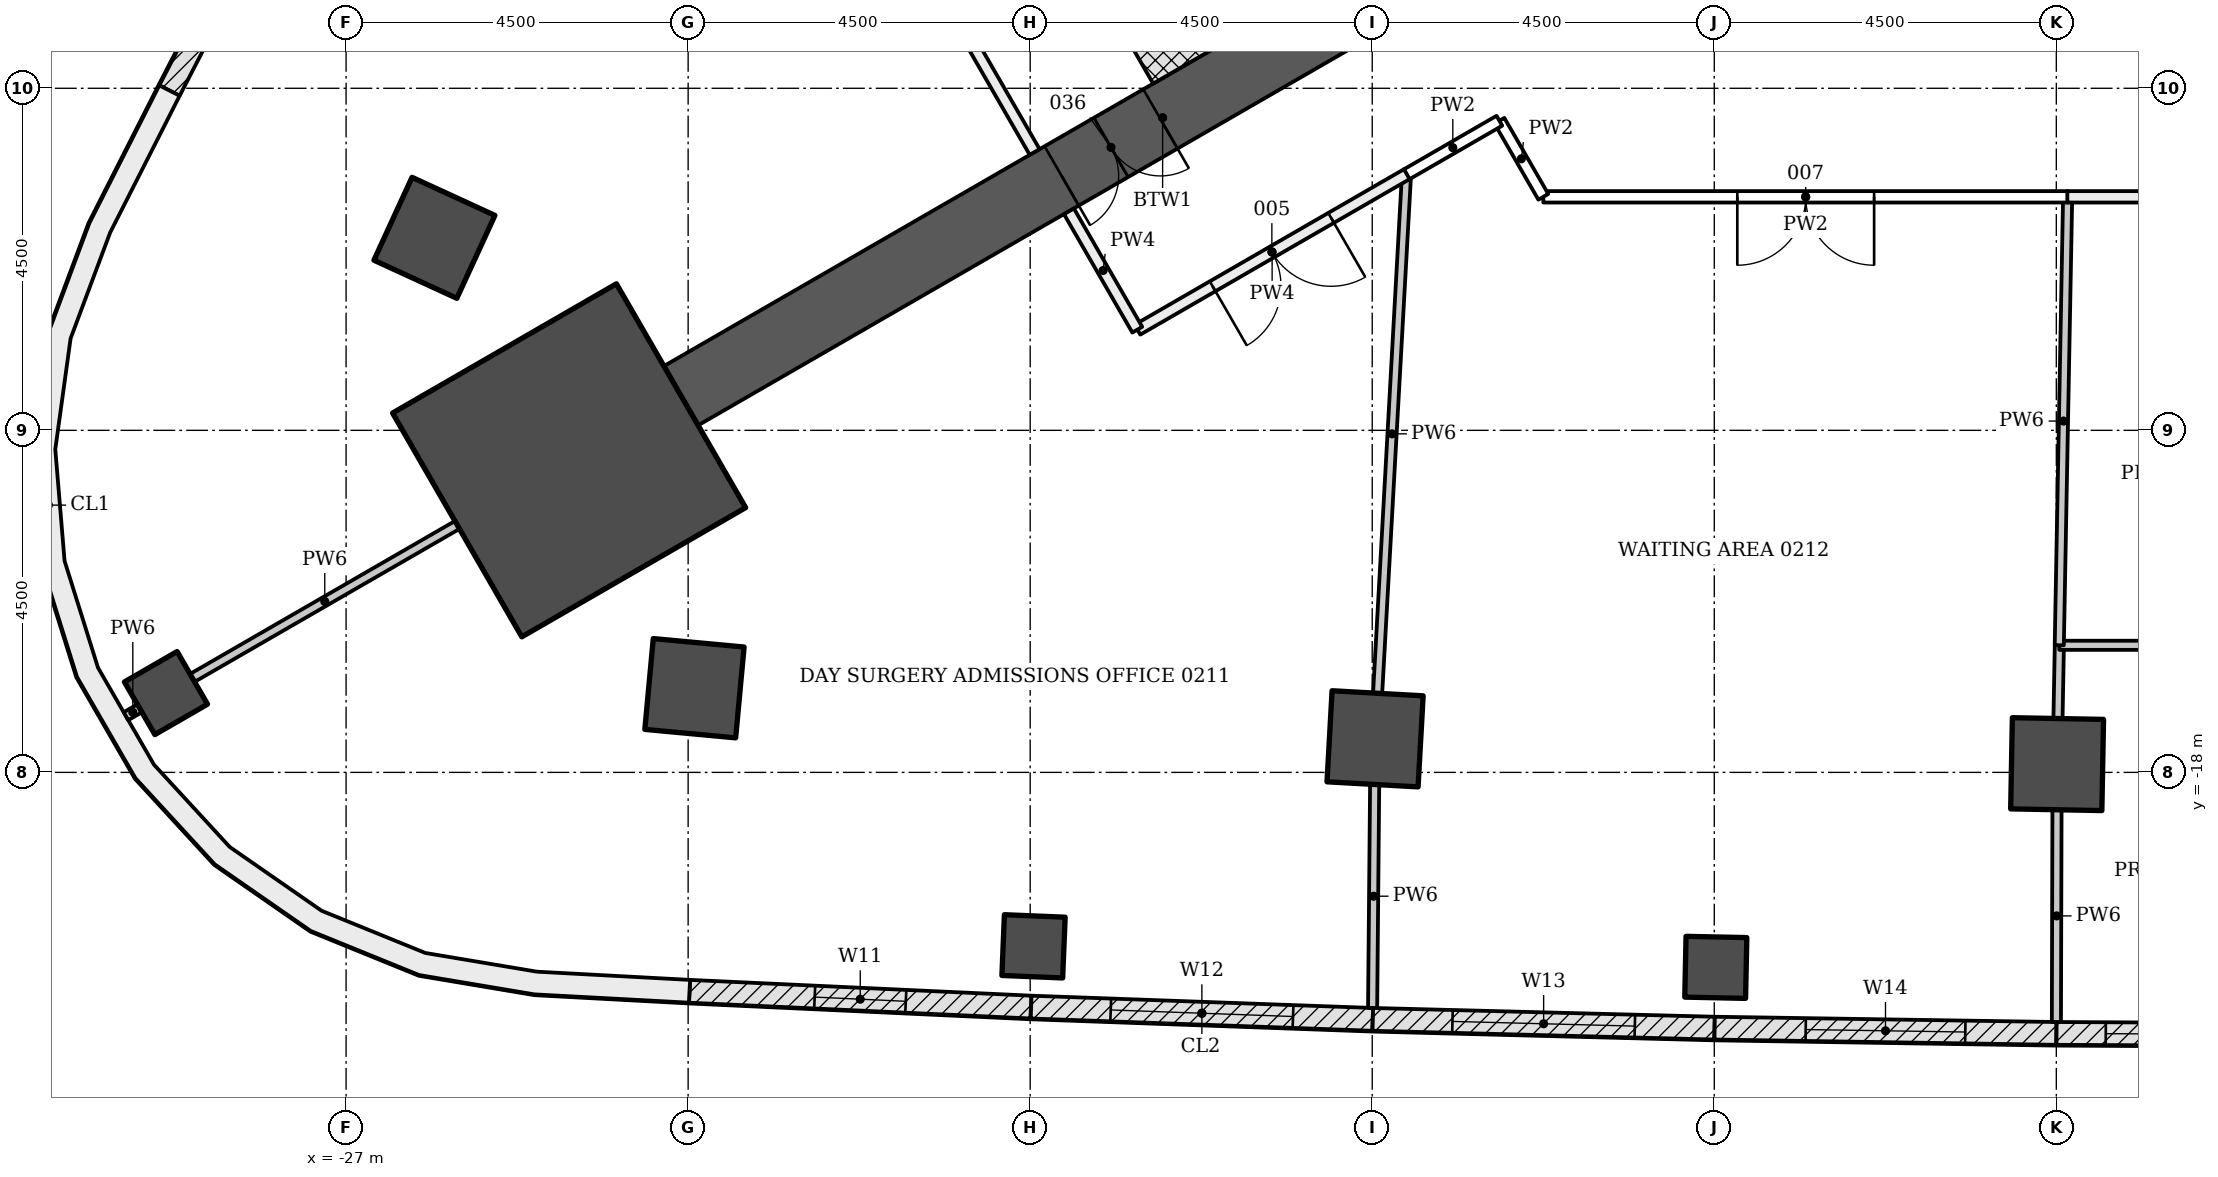
"""IFC4 building model, lengths in metres.
Left out: names, types, materials, properties, quantities, classifications, styles, units other than length and angle.
Written with IfcOpenShell. Run it as: python <this file> out.ifc"""

import sys

from ifc_helpers import new_model, si_unit, direction, frame, frame_2d, origin, origin_2d, place, context, subcontext, project, spatial, polyline, rectangle, outline, extrude, element, fill, save


model = new_model("IFC4")
c1 = context("Model", 3, precision=1e-05, world=origin(), true_north=direction((0.0, 1.0)))
c2 = subcontext(c1, "Body", "Model", "MODEL_VIEW")
j1 = project(units=[si_unit("LENGTHUNIT", "METRE"), si_unit("PLANEANGLEUNIT", "RADIAN")], contexts=[c1])
p1 = place(None, origin())
s1 = spatial("IfcSite", under=j1, at=p1, CompositionType="ELEMENT")
p2 = place(p1, origin())
s2 = spatial("IfcBuilding", under=s1, at=p2, CompositionType="ELEMENT")
p3 = place(p2, frame((0.0, 0.0, 10.5)))
s3 = spatial("IfcBuildingStorey", under=s2, at=p3, CompositionType="ELEMENT", Elevation=10.5)
for number, where, z_axis, x_axis in (
    (1, (-25.838, -10.967, -0.25), (0.0, 0.0, 1.0), (-0.909, 0.418, 0.0)),
    (2, (-22.417, -16.893, -0.25), (0.0, 0.0, 1.0), (-0.093, -0.996, 0.0)),
    (3, (-13.462, -17.558, -0.25), (0.0, 0.0, 1.0), (-0.056, -0.998, 0.0)),
    (4, (-4.49, -17.892, -0.25), (0.0, 0.0, 1.0), (-0.019, -1.0, 0.0)),
):
    element("IfcColumn", number, at=place(p3, frame(where, z_axis=z_axis, x_axis=x_axis)), inside=s3, PredefinedType="COLUMN", context=c2, shape_type="SweptSolid", body=[
        extrude(rectangle(XDim=1.2, YDim=1.2, at=origin_2d()), origin(), (0.0, 0.0, 1.0), 4.5),
    ])
for number, where, z_axis, x_axis in (
    (5, (-29.37, -16.957, -0.25), (0.0, 0.0, 1.0), (-0.866, -0.5, 0.0)),
    (6, (-17.956, -20.288, -0.25), (0.0, 0.0, 1.0), (-0.041, -0.999, 0.0)),
    (7, (-8.98, -20.565, -0.25), (0.0, 0.0, 1.0), (-0.021, -1.0, 0.0)),
):
    element("IfcColumn", number, at=place(p3, frame(where, z_axis=z_axis, x_axis=x_axis)), inside=s3, PredefinedType="COLUMN", context=c2, shape_type="SweptSolid", body=[
        extrude(rectangle(XDim=0.8, YDim=0.8, at=origin_2d()), origin(), (0.0, 0.0, 1.0), 4.5),
    ])
p4 = place(p3, frame((-9.922, -5.728, -0.25), z_axis=(0.0, 0.0, 1.0), x_axis=(-0.866028046028, -0.499995423472, 0.0)))
e8 = element("IfcWall", 8, at=p4, inside=s3, PredefinedType="SHEAR", context=c2, shape_type="SweptSolid", body=[
    extrude(rectangle(XDim=14.633, YDim=0.9, at=frame_2d((7.316, 0.0))), origin(), (0.0, 0.0, 1.0), 4.5),
])
p5 = place(p4, frame((7.35, 0.0, 0.25)))
e9 = element("IfcOpeningElement", 9, at=p5, cuts=e8, PredefinedType="OPENING", context=c2, shape_type="SweptSolid", body=[
    extrude(rectangle(XDim=1.5, YDim=2.1, at=frame_2d((0.75, 1.05))), frame((0.0, 0.46, 0.0), z_axis=(0.0, -1.0, 0.0), x_axis=(1.0, 0.0, 0.0)), (0.0, 0.0, 1.0), 0.92),
])
p6 = place(p3, frame((-24.066, -13.895, -0.25), z_axis=(0.0, 0.0, 1.0), x_axis=(-0.866025403784, -0.5, 0.0)))
e10 = element("IfcColumn", 10, at=p6, inside=s3, PredefinedType="COLUMN", context=c2, shape_type="SweptSolid", body=[
    extrude(rectangle(XDim=3.4, YDim=3.4, at=origin_2d()), origin(), (0.0, 0.0, 1.0), 4.5),
])
p7 = place(p3, frame((-29.323, -9.029, 0.0), z_axis=(0.0, 0.0, 1.0), x_axis=(0.459443600121, 0.888206945654, 0.0)))
e11 = element("IfcWall", 11, at=p7, inside=s3, PredefinedType="NOTDEFINED", context=c2, shape_type="SweptSolid", body=[
    extrude(rectangle(XDim=4.496, YDim=0.3, at=frame_2d((2.248, 0.0))), origin(), (0.0, 0.0, 1.0), 4.25),
])
p8 = place(p7, frame((1.648, 0.0, 0.8)))
e12 = element("IfcOpeningElement", 12, at=p8, cuts=e11, PredefinedType="OPENING", context=c2, shape_type="SweptSolid", body=[
    extrude(rectangle(XDim=1.2, YDim=3.0, at=frame_2d((0.6, 1.5))), frame((0.0, 0.16, 0.0), z_axis=(0.0, -1.0, 0.0), x_axis=(1.0, 0.0, 0.0)), (0.0, 0.0, 1.0), 0.32),
])
p9 = place(p3, frame((-17.99, -21.088, 0.0), z_axis=(0.0, 0.0, 1.0), x_axis=(-0.998931717866, 0.046210637742, 0.0)))
e13 = element("IfcWall", 13, at=p9, inside=s3, PredefinedType="NOTDEFINED", context=c2, shape_type="SweptSolid", body=[
    extrude(rectangle(XDim=4.496, YDim=0.3, at=frame_2d((2.248, 0.0))), origin(), (0.0, 0.0, 1.0), 4.25),
])
p10 = place(p9, frame((1.648, 0.0, 0.8)))
e14 = element("IfcOpeningElement", 14, at=p10, cuts=e13, PredefinedType="OPENING", context=c2, shape_type="SweptSolid", body=[
    extrude(rectangle(XDim=1.2, YDim=3.0, at=frame_2d((0.6, 1.5))), frame((0.0, 0.16, 0.0), z_axis=(0.0, -1.0, 0.0), x_axis=(1.0, 0.0, 0.0)), (0.0, 0.0, 1.0), 0.32),
])
p11 = place(p3, frame((-13.494, -21.249, 0.0), z_axis=(0.0, 0.0, 1.0), x_axis=(-0.999355640029, 0.035892962294, 0.0)))
e15 = element("IfcWall", 15, at=p11, inside=s3, PredefinedType="NOTDEFINED", context=c2, shape_type="SweptSolid", body=[
    extrude(rectangle(XDim=4.496, YDim=0.3, at=frame_2d((2.248, 0.0))), origin(), (0.0, 0.0, 1.0), 4.25),
])
p12 = place(p11, frame((1.048, 0.0, 0.9)))
e16 = element("IfcOpeningElement", 16, at=p12, cuts=e15, PredefinedType="OPENING", context=c2, shape_type="SweptSolid", body=[
    extrude(rectangle(XDim=2.4, YDim=2.4, at=frame_2d((1.2, 1.2))), frame((0.0, 0.16, 0.0), z_axis=(0.0, -1.0, 0.0), x_axis=(1.0, 0.0, 0.0)), (0.0, 0.0, 1.0), 0.32),
])
p13 = place(p3, frame((-8.998, -21.365, 0.0), z_axis=(0.0, 0.0, 1.0), x_axis=(-0.999671466587, 0.025631209312, 0.0)))
e17 = element("IfcWall", 17, at=p13, inside=s3, PredefinedType="NOTDEFINED", context=c2, shape_type="SweptSolid", body=[
    extrude(rectangle(XDim=4.496, YDim=0.3, at=frame_2d((2.248, 0.0))), origin(), (0.0, 0.0, 1.0), 4.25),
])
p14 = place(p13, frame((1.048, 0.0, 0.9)))
e18 = element("IfcOpeningElement", 18, at=p14, cuts=e17, PredefinedType="OPENING", context=c2, shape_type="SweptSolid", body=[
    extrude(rectangle(XDim=2.4, YDim=2.4, at=frame_2d((1.2, 1.2))), frame((0.0, 0.16, 0.0), z_axis=(0.0, -1.0, 0.0), x_axis=(1.0, 0.0, 0.0)), (0.0, 0.0, 1.0), 0.32),
])
p15 = place(p3, frame((-4.5, -21.434, 0.0), z_axis=(0.0, 0.0, 1.0), x_axis=(-0.999881921814, 0.015366926462, 0.0)))
e19 = element("IfcWall", 19, at=p15, inside=s3, PredefinedType="NOTDEFINED", context=c2, shape_type="SweptSolid", body=[
    extrude(rectangle(XDim=4.496, YDim=0.3, at=frame_2d((2.248, 0.0))), origin(), (0.0, 0.0, 1.0), 4.25),
])
p16 = place(p15, frame((1.198, 0.0, 0.8)))
e20 = element("IfcOpeningElement", 20, at=p16, cuts=e19, PredefinedType="OPENING", context=c2, shape_type="SweptSolid", body=[
    extrude(rectangle(XDim=2.1, YDim=3.0, at=frame_2d((1.05, 1.5))), frame((0.0, 0.16, 0.0), z_axis=(0.0, -1.0, 0.0), x_axis=(1.0, 0.0, 0.0)), (0.0, 0.0, 1.0), 0.32),
])
p17 = place(p3, frame((-0.001, -21.457, 0.0), z_axis=(0.0, 0.0, 1.0), x_axis=(-0.999986693461, 0.005158769258, 0.0)))
e21 = element("IfcWall", 21, at=p17, inside=s3, PredefinedType="NOTDEFINED", context=c2, shape_type="SweptSolid", body=[
    extrude(rectangle(XDim=4.496, YDim=0.3, at=frame_2d((2.248, 0.0))), origin(), (0.0, 0.0, 1.0), 4.25),
])
p18 = place(p17, frame((0.648, 0.0, 0.8)))
e22 = element("IfcOpeningElement", 22, at=p18, cuts=e21, PredefinedType="OPENING", context=c2, shape_type="SweptSolid", body=[
    extrude(rectangle(XDim=3.2, YDim=2.7, at=frame_2d((1.6, 1.35))), frame((0.0, 0.16, 0.0), z_axis=(0.0, -1.0, 0.0), x_axis=(1.0, 0.0, 0.0)), (0.0, 0.0, 1.0), 0.32),
])
p19 = place(p3, origin())
e23 = element("IfcWall", 23, at=p19, inside=s3, PredefinedType="NOTDEFINED", context=c2, shape_type="SweptSolid", body=[
    extrude(outline(polyline([(-29.457, -8.962), (-30.379, -10.776), (-30.917, -12.218), (-31.128, -13.742), (-31.0, -15.276), (-30.54, -16.744), (-29.771, -18.077), (-28.729, -19.209), (-27.465, -20.086), (-26.04, -20.666), (-24.522, -20.921), (-22.49, -21.03), (-22.474, -20.73), (-24.489, -20.622), (-25.957, -20.376), (-27.321, -19.821), (-28.531, -18.981), (-29.528, -17.898), (-30.264, -16.623), (-30.704, -15.218), (-30.826, -13.75), (-30.625, -12.292), (-30.104, -10.897), (-29.19, -9.098), (-29.457, -8.962)])), origin(), (0.0, 0.0, 1.0), 4.25),
])
p20 = place(p3, frame((-10.43, -4.847, -0.25), z_axis=(0.0, 0.0, 1.0), x_axis=(-0.866018442252, -0.500012057535, 0.0)))
e24 = element("IfcWall", 24, at=p20, inside=s3, PredefinedType="SHEAR", context=c2, shape_type="SweptSolid", body=[
    extrude(rectangle(XDim=7.2, YDim=1.136, at=frame_2d((3.6, 0.0))), origin(), (0.0, 0.0, 1.0), 4.5),
])
p21 = place(p3, frame((-4.491, -18.492, 0.0), z_axis=(0.0, 0.0, 1.0), x_axis=(-0.00288561233, -0.999995836612, 0.0)))
e25 = element("IfcWall", 25, at=p21, inside=s3, PredefinedType="PARTITIONING", context=c2, shape_type="SweptSolid", body=[
    extrude(rectangle(XDim=2.792, YDim=0.12, at=frame_2d((1.396, 0.0))), origin(), (0.0, 0.0, 1.0), 3.633),
])
p22 = place(p3, frame((-4.46, -16.324, 0.0), z_axis=(0.0, 0.0, 1.0), x_axis=(-0.018678891577, -0.999825534286, 0.0)))
e26 = element("IfcWall", 26, at=p22, inside=s3, PredefinedType="PARTITIONING", context=c2, shape_type="SweptSolid", body=[
    extrude(rectangle(XDim=0.967, YDim=0.12, at=frame_2d((0.484, 0.0))), origin(), (0.0, 0.0, 1.0), 3.638),
])
p23 = place(p3, frame((0.0, -16.328, 0.0), z_axis=(0.0, 0.0, 1.0), x_axis=(-1.0, 0.0, 0.0)))
e27 = element("IfcWall", 27, at=p23, inside=s3, PredefinedType="PARTITIONING", context=c2, shape_type="SweptSolid", body=[
    extrude(rectangle(XDim=4.461, YDim=0.12, at=frame_2d((2.23, 0.0))), origin(), (0.0, 0.0, 1.0), 3.638),
])
p24 = place(p23, frame((1.75, 0.0, 0.0)))
e28 = element("IfcOpeningElement", 28, at=p24, cuts=e27, PredefinedType="OPENING", context=c2, shape_type="SweptSolid", body=[
    extrude(rectangle(XDim=1.0, YDim=2.1, at=frame_2d((0.5, 1.05))), frame((0.0, 0.07, 0.0), z_axis=(0.0, -1.0, 0.0), x_axis=(1.0, 0.0, 0.0)), (0.0, 0.0, 1.0), 0.14),
])
p25 = place(p3, frame((-13.495, -21.099, 0.0), z_axis=(0.0, 0.0, 1.0), x_axis=(0.009216581037, 0.999957526415, 0.0)))
e29 = element("IfcWall", 29, at=p25, inside=s3, PredefinedType="PARTITIONING", context=c2, shape_type="SweptSolid", body=[
    extrude(rectangle(XDim=2.94, YDim=0.12, at=frame_2d((1.47, 0.0))), origin(), (0.0, 0.0, 1.0), 3.633),
])
p26 = place(p3, frame((-13.429, -16.96, 0.0), z_axis=(0.0, 0.0, 1.0), x_axis=(0.055551088657, 0.998455846069, 0.0)))
e30 = element("IfcWall", 30, at=p26, inside=s3, PredefinedType="PARTITIONING", context=c2, shape_type="SweptSolid", body=[
    extrude(rectangle(XDim=6.838, YDim=0.12, at=frame_2d((3.419, 0.0))), origin(), (0.0, 0.0, 1.0), 3.638),
])
p27 = place(p3, frame((-13.045, -10.13, 0.0), z_axis=(0.0, 0.0, 1.0), x_axis=(-0.866035577775, -0.499982377718, 0.0)))
e31 = element("IfcWall", 31, at=p27, inside=s3, PredefinedType="PARTITIONING", context=c2, shape_type="SweptSolid", body=[
    extrude(rectangle(XDim=4.093, YDim=0.15, at=frame_2d((2.046, 0.0))), origin(), (0.0, 0.0, 1.0), 3.638),
])
p28 = place(p27, frame((1.15, 0.0, 0.0)))
e32 = element("IfcOpeningElement", 32, at=p28, cuts=e31, PredefinedType="OPENING", context=c2, shape_type="SweptSolid", body=[
    extrude(rectangle(XDim=1.8, YDim=2.1, at=frame_2d((0.9, 1.05))), frame((0.0, 0.085, 0.0), z_axis=(0.0, -1.0, 0.0), x_axis=(1.0, 0.0, 0.0)), (0.0, 0.0, 1.0), 0.17),
])
p29 = place(p3, frame((-16.591, -12.176, 0.0), z_axis=(0.0, 0.0, 1.0), x_axis=(-0.499965372359, 0.866045395139, 0.0)))
e33 = element("IfcWall", 33, at=p29, inside=s3, PredefinedType="PARTITIONING", context=c2, shape_type="SweptSolid", body=[
    extrude(rectangle(XDim=1.798, YDim=0.15, at=frame_2d((0.899, 0.0))), origin(), (0.0, 0.0, 1.0), 3.638),
])
p30 = place(p3, frame((-29.716, -17.157, 0.0), z_axis=(0.0, 0.0, 1.0), x_axis=(-0.865774595023, -0.500434162116, 0.0)))
e34 = element("IfcWall", 34, at=p30, inside=s3, PredefinedType="PARTITIONING", context=c2, shape_type="SweptSolid", body=[
    extrude(rectangle(XDim=0.208, YDim=0.12, at=frame_2d((0.104, 0.0))), origin(), (0.0, 0.0, 1.0), 4.25),
])
p31 = place(p3, frame((-25.538, -14.745, 0.0), z_axis=(0.0, 0.0, 1.0), x_axis=(-0.866027971625, -0.499995552344, 0.0)))
e35 = element("IfcWall", 35, at=p31, inside=s3, PredefinedType="PARTITIONING", context=c2, shape_type="SweptSolid", body=[
    extrude(rectangle(XDim=4.024, YDim=0.12, at=frame_2d((2.012, 0.0))), origin(), (0.0, 0.0, 1.0), 3.717),
])
p32 = place(p3, frame((-4.461, -16.327, 0.0), z_axis=(0.0, 0.0, 1.0), x_axis=(0.018624139004, 0.999826555682, 0.0)))
e36 = element("IfcWall", 36, at=p32, inside=s3, PredefinedType="PARTITIONING", context=c2, shape_type="SweptSolid", body=[
    extrude(rectangle(XDim=5.899, YDim=0.12, at=frame_2d((2.949, 0.0))), origin(), (0.0, 0.0, 1.0), 3.638),
])
p33 = place(p3, frame((-4.347, -10.428, 0.0), z_axis=(0.0, 0.0, 1.0), x_axis=(-1.0, 0.0, 0.0)))
e37 = element("IfcWall", 37, at=p33, inside=s3, PredefinedType="PARTITIONING", context=c2, shape_type="SweptSolid", body=[
    extrude(rectangle(XDim=6.902, YDim=0.15, at=frame_2d((3.451, 0.0))), origin(), (0.0, 0.0, 1.0), 3.638),
])
p34 = place(p33, frame((2.55, 0.0, 0.0)))
e38 = element("IfcOpeningElement", 38, at=p34, cuts=e37, PredefinedType="OPENING", context=c2, shape_type="SweptSolid", body=[
    extrude(rectangle(XDim=1.8, YDim=2.1, at=frame_2d((0.9, 1.05))), frame((0.0, 0.085, 0.0), z_axis=(0.0, -1.0, 0.0), x_axis=(1.0, 0.0, 0.0)), (0.0, 0.0, 1.0), 0.17),
])
p35 = place(p3, frame((-11.249, -10.428, 0.0), z_axis=(0.0, 0.0, 1.0), x_axis=(-0.499978438088, 0.866037852202, 0.0)))
e39 = element("IfcWall", 39, at=p35, inside=s3, PredefinedType="PARTITIONING", context=c2, shape_type="SweptSolid", body=[
    extrude(rectangle(XDim=1.156, YDim=0.15, at=frame_2d((0.578, 0.0))), origin(), (0.0, 0.0, 1.0), 4.25),
])
p36 = place(p3, frame((-11.827, -9.427, 0.0), z_axis=(0.0, 0.0, 1.0), x_axis=(-0.865984561414, -0.500070734389, 0.0)))
e40 = element("IfcWall", 40, at=p36, inside=s3, PredefinedType="PARTITIONING", context=c2, shape_type="SweptSolid", body=[
    extrude(rectangle(XDim=1.416, YDim=0.15, at=frame_2d((0.708, 0.0))), origin(), (0.0, 0.0, 1.0), 3.638),
])
p37 = place(p3, frame((0.004, -10.428, 0.0), z_axis=(0.0, 0.0, 1.0), x_axis=(-1.0, 0.0, 0.0)))
e41 = element("IfcWall", 41, at=p37, inside=s3, PredefinedType="PARTITIONING", context=c2, shape_type="SweptSolid", body=[
    extrude(rectangle(XDim=4.359, YDim=0.15, at=frame_2d((2.179, 0.0))), origin(), (0.0, 0.0, 1.0), 3.638),
])
p38 = place(p37, frame((1.65, 0.0, 0.0)))
e42 = element("IfcOpeningElement", 42, at=p38, cuts=e41, PredefinedType="OPENING", context=c2, shape_type="SweptSolid", body=[
    extrude(rectangle(XDim=1.0, YDim=2.1, at=frame_2d((0.5, 1.05))), frame((0.0, 0.085, 0.0), z_axis=(0.0, -1.0, 0.0), x_axis=(1.0, 0.0, 0.0)), (0.0, 0.0, 1.0), 0.17),
])
p39 = place(p3, frame((-17.941, -9.838, 0.0), z_axis=(0.0, 0.0, 1.0), x_axis=(-0.500048140185, 0.865997608252, 0.0)))
e43 = element("IfcWall", 43, at=p39, inside=s3, PredefinedType="PARTITIONING", context=c2, shape_type="SweptSolid", body=[
    extrude(rectangle(XDim=6.683, YDim=0.15, at=frame_2d((3.342, 0.0))), origin(), (0.0, 0.0, 1.0), 3.638),
])
p40 = place(p39, frame((2.45, 0.0, 0.0)))
e44 = element("IfcOpeningElement", 44, at=p40, cuts=e43, PredefinedType="OPENING", context=c2, shape_type="SweptSolid", body=[
    extrude(rectangle(XDim=1.8, YDim=2.1, at=frame_2d((0.9, 1.05))), frame((0.0, 0.085, 0.0), z_axis=(0.0, -1.0, 0.0), x_axis=(1.0, 0.0, 0.0)), (0.0, 0.0, 1.0), 0.17),
])
p41 = place(p10, origin())
e45 = element("IfcWindow", 45, at=p41, inside=s3, PartitioningType="SINGLE_PANEL", PredefinedType="WINDOW", context=c2, shape_type="SweptSolid", body=[
    extrude(rectangle(XDim=1.2, YDim=3.0, at=frame_2d((0.6, 1.5))), frame((0.0, 0.03, 0.0), z_axis=(0.0, -1.0, 0.0), x_axis=(1.0, 0.0, 0.0)), (0.0, 0.0, 1.0), 0.06),
])
fill(e14, e45)
p42 = place(p12, origin())
e46 = element("IfcWindow", 46, at=p42, inside=s3, PartitioningType="DOUBLE_PANEL_VERTICAL", PredefinedType="WINDOW", context=c2, shape_type="SweptSolid", body=[
    extrude(rectangle(XDim=2.4, YDim=2.4, at=frame_2d((1.2, 1.2))), frame((0.0, 0.03, 0.0), z_axis=(0.0, -1.0, 0.0), x_axis=(1.0, 0.0, 0.0)), (0.0, 0.0, 1.0), 0.06),
])
fill(e16, e46)
p43 = place(p14, origin())
e47 = element("IfcWindow", 47, at=p43, inside=s3, PartitioningType="DOUBLE_PANEL_VERTICAL", PredefinedType="WINDOW", context=c2, shape_type="SweptSolid", body=[
    extrude(rectangle(XDim=2.4, YDim=2.4, at=frame_2d((1.2, 1.2))), frame((0.0, 0.03, 0.0), z_axis=(0.0, -1.0, 0.0), x_axis=(1.0, 0.0, 0.0)), (0.0, 0.0, 1.0), 0.06),
])
fill(e18, e47)
p44 = place(p16, origin())
e48 = element("IfcWindow", 48, at=p44, inside=s3, PartitioningType="DOUBLE_PANEL_HORIZONTAL", PredefinedType="WINDOW", context=c2, shape_type="SweptSolid", body=[
    extrude(rectangle(XDim=2.1, YDim=3.0, at=frame_2d((1.05, 1.5))), frame((0.0, 0.03, 0.0), z_axis=(0.0, -1.0, 0.0), x_axis=(1.0, 0.0, 0.0)), (0.0, 0.0, 1.0), 0.06),
])
fill(e20, e48)
p45 = place(p18, origin())
e49 = element("IfcWindow", 49, at=p45, inside=s3, PartitioningType="TRIPLE_PANEL_VERTICAL", PredefinedType="WINDOW", context=c2, shape_type="SweptSolid", body=[
    extrude(rectangle(XDim=3.2, YDim=2.7, at=frame_2d((1.6, 1.35))), frame((0.0, 0.03, 0.0), z_axis=(0.0, -1.0, 0.0), x_axis=(1.0, 0.0, 0.0)), (0.0, 0.0, 1.0), 0.06),
])
fill(e22, e49)
p46 = place(p28, origin())
e50 = element("IfcDoor", 50, at=p46, inside=s3, OperationType="DOUBLE_DOOR_SINGLE_SWING", PredefinedType="DOOR", context=c2, shape_type="SweptSolid", body=[
    extrude(rectangle(XDim=1.8, YDim=2.1, at=frame_2d((0.9, 1.05))), frame((0.0, 0.025, 0.0), z_axis=(0.0, -1.0, 0.0), x_axis=(1.0, 0.0, 0.0)), (0.0, 0.0, 1.0), 0.05),
])
fill(e32, e50)
p47 = place(p34, origin())
e51 = element("IfcDoor", 51, at=p47, inside=s3, OperationType="DOUBLE_DOOR_SINGLE_SWING", PredefinedType="DOOR", context=c2, shape_type="SweptSolid", body=[
    extrude(rectangle(XDim=1.8, YDim=2.1, at=frame_2d((0.9, 1.05))), frame((0.0, 0.025, 0.0), z_axis=(0.0, -1.0, 0.0), x_axis=(1.0, 0.0, 0.0)), (0.0, 0.0, 1.0), 0.05),
])
fill(e38, e51)
p48 = place(p5, origin())
e52 = element("IfcDoor", 52, at=p48, inside=s3, OperationType="DOUBLE_DOOR_SINGLE_SWING", PredefinedType="DOOR", context=c2, shape_type="SweptSolid", body=[
    extrude(rectangle(XDim=1.5, YDim=2.1, at=frame_2d((0.75, 1.05))), frame((0.0, 0.025, 0.0), z_axis=(0.0, -1.0, 0.0), x_axis=(1.0, 0.0, 0.0)), (0.0, 0.0, 1.0), 0.05),
])
fill(e9, e52)
save(model, sys.argv[1])
